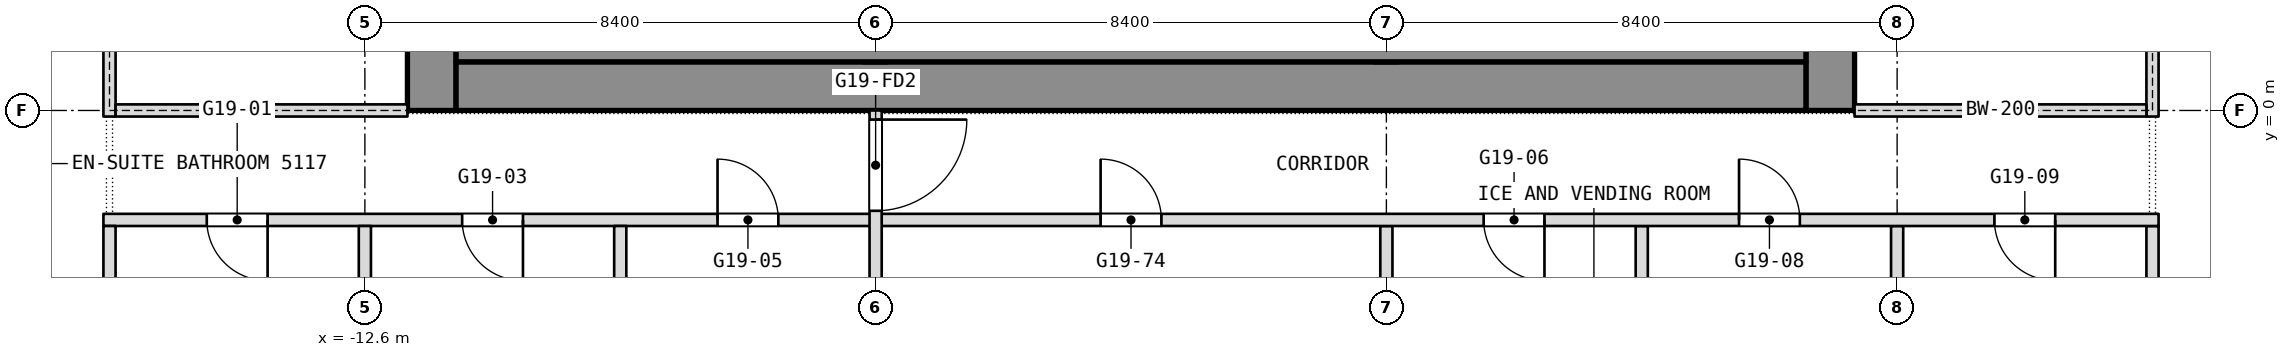
"""IFC4 building model, lengths in metres.
Left out: names, types, materials, properties, quantities, classifications, styles, units other than length and angle.
Written with IfcOpenShell. Run it as: python <this file> out.ifc"""

import sys

from ifc_helpers import new_model, si_unit, direction, frame, frame_2d, origin, place, context, subcontext, project, spatial, rectangle, extrude, element, fill, save


model = new_model("IFC4")
c1 = context("Model", 3, precision=1e-05, world=origin(), true_north=direction((0.0, 1.0)))
c2 = subcontext(c1, "Body", "Model", "MODEL_VIEW")
j1 = project(units=[si_unit("LENGTHUNIT", "METRE"), si_unit("PLANEANGLEUNIT", "RADIAN")], contexts=[c1])
p1 = place(None, origin())
s1 = spatial("IfcSite", under=j1, at=p1, CompositionType="ELEMENT")
p2 = place(p1, origin())
s2 = spatial("IfcBuilding", under=s1, at=p2, CompositionType="ELEMENT")
p3 = place(p2, frame((0.0, 0.0, 220.1)))
s3 = spatial("IfcBuildingStorey", under=s2, at=p3, CompositionType="ELEMENT", Elevation=220.1)
p4 = place(p3, frame((11.5, 0.0, 0.0), z_axis=(0.0, 0.0, 1.0), x_axis=(0.0, 1.0, 0.0)))
e1 = element("IfcWall", 1, at=p4, inside=s3, PredefinedType="SHEAR", context=c2, shape_type="SweptSolid", body=[
    extrude(rectangle(XDim=16.8, YDim=0.8, at=frame_2d((8.4, 0.0))), origin(), (0.0, 0.0, 1.0), 3.6),
])
p5 = place(p4, frame((2.3, 0.0, 0.0)))
e2 = element("IfcOpeningElement", 2, at=p5, cuts=e1, PredefinedType="OPENING", context=c2, shape_type="SweptSolid", body=[
    extrude(rectangle(XDim=1.1, YDim=2.1, at=frame_2d((0.55, 1.05))), frame((0.0, 0.4, 0.0), z_axis=(0.0, -1.0, 0.0), x_axis=(1.0, 0.0, 0.0)), (0.0, 0.0, 1.0), 0.8),
])
p6 = place(p4, frame((4.85, 0.0, 0.0)))
e3 = element("IfcOpeningElement", 3, at=p6, cuts=e1, PredefinedType="OPENING", context=c2, shape_type="SweptSolid", body=[
    extrude(rectangle(XDim=1.1, YDim=2.1, at=frame_2d((0.55, 1.05))), frame((0.0, 0.4, 0.0), z_axis=(0.0, -1.0, 0.0), x_axis=(1.0, 0.0, 0.0)), (0.0, 0.0, 1.0), 0.8),
])
p7 = place(p4, frame((6.825, 0.0, 0.0)))
e4 = element("IfcOpeningElement", 4, at=p7, cuts=e1, PredefinedType="OPENING", context=c2, shape_type="SweptSolid", body=[
    extrude(rectangle(XDim=1.2, YDim=2.1, at=frame_2d((0.6, 1.05))), frame((0.0, 0.4, 0.0), z_axis=(0.0, -1.0, 0.0), x_axis=(1.0, 0.0, 0.0)), (0.0, 0.0, 1.0), 0.8),
])
p8 = place(p4, frame((13.4, 0.0, 0.0)))
e5 = element("IfcOpeningElement", 5, at=p8, cuts=e1, PredefinedType="OPENING", context=c2, shape_type="SweptSolid", body=[
    extrude(rectangle(XDim=1.1, YDim=2.1, at=frame_2d((0.55, 1.05))), frame((0.0, 0.4, 0.0), z_axis=(0.0, -1.0, 0.0), x_axis=(1.0, 0.0, 0.0)), (0.0, 0.0, 1.0), 0.8),
])
p9 = place(p4, frame((10.85, 0.0, 0.0)))
e6 = element("IfcOpeningElement", 6, at=p9, cuts=e1, PredefinedType="OPENING", context=c2, shape_type="SweptSolid", body=[
    extrude(rectangle(XDim=1.1, YDim=2.1, at=frame_2d((0.55, 1.05))), frame((0.0, 0.4, 0.0), z_axis=(0.0, -1.0, 0.0), x_axis=(1.0, 0.0, 0.0)), (0.0, 0.0, 1.0), 0.8),
])
p10 = place(p4, frame((8.775, 0.0, 0.0)))
e7 = element("IfcOpeningElement", 7, at=p10, cuts=e1, PredefinedType="OPENING", context=c2, shape_type="SweptSolid", body=[
    extrude(rectangle(XDim=1.2, YDim=2.1, at=frame_2d((0.6, 1.05))), frame((0.0, 0.4, 0.0), z_axis=(0.0, -1.0, 0.0), x_axis=(1.0, 0.0, 0.0)), (0.0, 0.0, 1.0), 0.8),
])
p11 = place(p3, frame((-11.5, 0.0, 0.0), z_axis=(0.0, 0.0, 1.0), x_axis=(0.0, 1.0, 0.0)))
e8 = element("IfcWall", 8, at=p11, inside=s3, PredefinedType="SHEAR", context=c2, shape_type="SweptSolid", body=[
    extrude(rectangle(XDim=16.8, YDim=0.8, at=frame_2d((8.4, 0.0))), origin(), (0.0, 0.0, 1.0), 3.6),
])
p12 = place(p11, frame((3.6, 0.0, 0.0)))
e9 = element("IfcOpeningElement", 9, at=p12, cuts=e8, PredefinedType="OPENING", context=c2, shape_type="SweptSolid", body=[
    extrude(rectangle(XDim=0.9, YDim=2.1, at=frame_2d((0.45, 1.05))), frame((0.0, 0.4, 0.0), z_axis=(0.0, -1.0, 0.0), x_axis=(1.0, 0.0, 0.0)), (0.0, 0.0, 1.0), 0.8),
])
p13 = place(p11, frame((6.825, 0.0, 0.0)))
e10 = element("IfcOpeningElement", 10, at=p13, cuts=e8, PredefinedType="OPENING", context=c2, shape_type="SweptSolid", body=[
    extrude(rectangle(XDim=1.2, YDim=2.1, at=frame_2d((0.6, 1.05))), frame((0.0, 0.4, 0.0), z_axis=(0.0, -1.0, 0.0), x_axis=(1.0, 0.0, 0.0)), (0.0, 0.0, 1.0), 0.8),
])
p14 = place(p11, frame((12.3, 0.0, 0.0)))
e11 = element("IfcOpeningElement", 11, at=p14, cuts=e8, PredefinedType="OPENING", context=c2, shape_type="SweptSolid", body=[
    extrude(rectangle(XDim=0.9, YDim=2.1, at=frame_2d((0.45, 1.05))), frame((0.0, 0.4, 0.0), z_axis=(0.0, -1.0, 0.0), x_axis=(1.0, 0.0, 0.0)), (0.0, 0.0, 1.0), 0.8),
])
p15 = place(p11, frame((8.775, 0.0, 0.0)))
e12 = element("IfcOpeningElement", 12, at=p15, cuts=e8, PredefinedType="OPENING", context=c2, shape_type="SweptSolid", body=[
    extrude(rectangle(XDim=1.2, YDim=2.1, at=frame_2d((0.6, 1.05))), frame((0.0, 0.4, 0.0), z_axis=(0.0, -1.0, 0.0), x_axis=(1.0, 0.0, 0.0)), (0.0, 0.0, 1.0), 0.8),
])
p16 = place(p3, frame((-11.1, 0.4, 0.0), z_axis=(0.0, 0.0, 1.0), x_axis=(1.0, 0.0, 0.0)))
e13 = element("IfcWall", 13, at=p16, inside=s3, PredefinedType="SHEAR", context=c2, shape_type="SweptSolid", body=[
    extrude(rectangle(XDim=22.2, YDim=0.8, at=frame_2d((11.1, 0.0))), origin(), (0.0, 0.0, 1.0), 3.6),
])
p17 = place(p3, frame((-4.2, 0.8, 0.0), z_axis=(0.0, 0.0, 1.0), x_axis=(0.0, 1.0, 0.0)))
e14 = element("IfcWall", 14, at=p17, inside=s3, PredefinedType="SHEAR", context=c2, shape_type="SweptSolid", body=[
    extrude(rectangle(XDim=15.2, YDim=0.4, at=frame_2d((7.6, 0.0))), origin(), (0.0, 0.0, 1.0), 3.6),
])
p18 = place(p17, frame((8.5, 0.0, 0.0)))
e15 = element("IfcOpeningElement", 15, at=p18, cuts=e14, PredefinedType="OPENING", context=c2, shape_type="SweptSolid", body=[
    extrude(rectangle(XDim=1.2, YDim=2.1, at=frame_2d((0.6, 1.05))), frame((0.0, 0.2, 0.0), z_axis=(0.0, -1.0, 0.0), x_axis=(1.0, 0.0, 0.0)), (0.0, 0.0, 1.0), 0.4),
])
p19 = place(p3, frame((4.2, 0.8, 0.0), z_axis=(0.0, 0.0, 1.0), x_axis=(0.0, 1.0, 0.0)))
e16 = element("IfcWall", 16, at=p19, inside=s3, PredefinedType="SHEAR", context=c2, shape_type="SweptSolid", body=[
    extrude(rectangle(XDim=15.2, YDim=0.4, at=frame_2d((7.6, 0.0))), origin(), (0.0, 0.0, 1.0), 3.6),
])
p20 = place(p19, frame((5.95, 0.0, 0.0)))
e17 = element("IfcOpeningElement", 17, at=p20, cuts=e16, PredefinedType="OPENING", context=c2, shape_type="SweptSolid", body=[
    extrude(rectangle(XDim=1.2, YDim=2.1, at=frame_2d((0.6, 1.05))), frame((0.0, 0.2, 0.0), z_axis=(0.0, -1.0, 0.0), x_axis=(1.0, 0.0, 0.0)), (0.0, 0.0, 1.0), 0.4),
])
for number, where, z_axis, x_axis in (
    (18, (16.8, -7.8, 0.0), (0.0, 0.0, 1.0), (0.0, 1.0, 0.0)),
    (19, (12.6, -7.8, 0.0), (0.0, 0.0, 1.0), (0.0, 1.0, 0.0)),
):
    element("IfcWall", number, at=place(p3, frame(where, z_axis=z_axis, x_axis=x_axis)), inside=s3, PredefinedType="PARTITIONING", context=c2, shape_type="SweptSolid", body=[
        extrude(rectangle(XDim=5.9, YDim=0.2, at=frame_2d((2.95, 0.0))), origin(), (0.0, 0.0, 1.0), 3.34),
    ])
p21 = place(p3, frame((8.4, -8.0, 0.0), z_axis=(0.0, 0.0, 1.0), x_axis=(0.0, 1.0, 0.0)))
e20 = element("IfcWall", 20, at=p21, inside=s3, PredefinedType="PARTITIONING", context=c2, shape_type="SweptSolid", body=[
    extrude(rectangle(XDim=6.1, YDim=0.2, at=frame_2d((3.05, 0.0))), origin(), (0.0, 0.0, 1.0), 3.34),
])
p22 = place(p3, frame((4.2, -11.6, 0.0), z_axis=(0.0, 0.0, 1.0), x_axis=(0.0, 1.0, 0.0)))
e21 = element("IfcWall", 21, at=p22, inside=s3, PredefinedType="PARTITIONING", context=c2, shape_type="SweptSolid", body=[
    extrude(rectangle(XDim=9.7, YDim=0.2, at=frame_2d((4.85, 0.0))), origin(), (0.0, 0.0, 1.0), 3.34),
])
p23 = place(p3, frame((-16.9, -1.8, 0.0), z_axis=(0.0, 0.0, 1.0), x_axis=(1.0, 0.0, 0.0)))
e22 = element("IfcWall", 22, at=p23, inside=s3, PredefinedType="PARTITIONING", context=c2, shape_type="SweptSolid", body=[
    extrude(rectangle(XDim=33.8, YDim=0.2, at=frame_2d((16.9, 0.0))), origin(), (0.0, 0.0, 1.0), 3.34),
])
p24 = place(p23, frame((1.7, 0.0, 0.0)))
e23 = element("IfcOpeningElement", 23, at=p24, cuts=e22, PredefinedType="OPENING", context=c2, shape_type="SweptSolid", body=[
    extrude(rectangle(XDim=1.0, YDim=2.1, at=frame_2d((0.5, 1.05))), frame((0.0, 0.1, 0.0), z_axis=(0.0, -1.0, 0.0), x_axis=(1.0, 0.0, 0.0)), (0.0, 0.0, 1.0), 0.2),
])
p25 = place(p23, frame((5.9, 0.0, 0.0)))
e24 = element("IfcOpeningElement", 24, at=p25, cuts=e22, PredefinedType="OPENING", context=c2, shape_type="SweptSolid", body=[
    extrude(rectangle(XDim=1.0, YDim=2.1, at=frame_2d((0.5, 1.05))), frame((0.0, 0.1, 0.0), z_axis=(0.0, -1.0, 0.0), x_axis=(1.0, 0.0, 0.0)), (0.0, 0.0, 1.0), 0.2),
])
p26 = place(p23, frame((10.1, 0.0, 0.0)))
e25 = element("IfcOpeningElement", 25, at=p26, cuts=e22, PredefinedType="OPENING", context=c2, shape_type="SweptSolid", body=[
    extrude(rectangle(XDim=1.0, YDim=2.1, at=frame_2d((0.5, 1.05))), frame((0.0, 0.1, 0.0), z_axis=(0.0, -1.0, 0.0), x_axis=(1.0, 0.0, 0.0)), (0.0, 0.0, 1.0), 0.2),
])
p27 = place(p23, frame((22.7, 0.0, 0.0)))
e26 = element("IfcOpeningElement", 26, at=p27, cuts=e22, PredefinedType="OPENING", context=c2, shape_type="SweptSolid", body=[
    extrude(rectangle(XDim=1.0, YDim=2.1, at=frame_2d((0.5, 1.05))), frame((0.0, 0.1, 0.0), z_axis=(0.0, -1.0, 0.0), x_axis=(1.0, 0.0, 0.0)), (0.0, 0.0, 1.0), 0.2),
])
p28 = place(p23, frame((26.9, 0.0, 0.0)))
e27 = element("IfcOpeningElement", 27, at=p28, cuts=e22, PredefinedType="OPENING", context=c2, shape_type="SweptSolid", body=[
    extrude(rectangle(XDim=1.0, YDim=2.1, at=frame_2d((0.5, 1.05))), frame((0.0, 0.1, 0.0), z_axis=(0.0, -1.0, 0.0), x_axis=(1.0, 0.0, 0.0)), (0.0, 0.0, 1.0), 0.2),
])
p29 = place(p23, frame((31.1, 0.0, 0.0)))
e28 = element("IfcOpeningElement", 28, at=p29, cuts=e22, PredefinedType="OPENING", context=c2, shape_type="SweptSolid", body=[
    extrude(rectangle(XDim=1.0, YDim=2.1, at=frame_2d((0.5, 1.05))), frame((0.0, 0.1, 0.0), z_axis=(0.0, -1.0, 0.0), x_axis=(1.0, 0.0, 0.0)), (0.0, 0.0, 1.0), 0.2),
])
p30 = place(p23, frame((16.4, 0.0, 0.0)))
e29 = element("IfcOpeningElement", 29, at=p30, cuts=e22, PredefinedType="OPENING", context=c2, shape_type="SweptSolid", body=[
    extrude(rectangle(XDim=1.0, YDim=2.1, at=frame_2d((0.5, 1.05))), frame((0.0, 0.1, 0.0), z_axis=(0.0, -1.0, 0.0), x_axis=(1.0, 0.0, 0.0)), (0.0, 0.0, 1.0), 0.2),
])
p31 = place(p3, frame((-4.2, -13.6, 0.0), z_axis=(0.0, 0.0, 1.0), x_axis=(0.0, 1.0, 0.0)))
e30 = element("IfcWall", 30, at=p31, inside=s3, PredefinedType="PARTITIONING", context=c2, shape_type="SweptSolid", body=[
    extrude(rectangle(XDim=13.6, YDim=0.2, at=frame_2d((6.8, 0.0))), origin(), (0.0, 0.0, 1.0), 3.34),
])
p32 = place(p31, frame((11.95, 0.0, 0.0)))
e31 = element("IfcOpeningElement", 31, at=p32, cuts=e30, PredefinedType="OPENING", context=c2, shape_type="SweptSolid", body=[
    extrude(rectangle(XDim=1.5, YDim=2.1, at=frame_2d((0.75, 1.05))), frame((0.0, 0.1, 0.0), z_axis=(0.0, -1.0, 0.0), x_axis=(1.0, 0.0, 0.0)), (0.0, 0.0, 1.0), 0.2),
])
p33 = place(p31, frame((0.25, 0.0, 0.0)))
e32 = element("IfcOpeningElement", 32, at=p33, cuts=e30, PredefinedType="OPENING", context=c2, shape_type="SweptSolid", body=[
    extrude(rectangle(XDim=1.5, YDim=2.1, at=frame_2d((0.75, 1.05))), frame((0.0, 0.1, 0.0), z_axis=(0.0, -1.0, 0.0), x_axis=(1.0, 0.0, 0.0)), (0.0, 0.0, 1.0), 0.2),
])
p34 = place(p3, frame((-8.4, -8.0, 0.0), z_axis=(0.0, 0.0, 1.0), x_axis=(0.0, 1.0, 0.0)))
e33 = element("IfcWall", 33, at=p34, inside=s3, PredefinedType="PARTITIONING", context=c2, shape_type="SweptSolid", body=[
    extrude(rectangle(XDim=6.1, YDim=0.2, at=frame_2d((3.05, 0.0))), origin(), (0.0, 0.0, 1.0), 3.34),
])
p35 = place(p3, frame((-12.6, -7.8, 0.0), z_axis=(0.0, 0.0, 1.0), x_axis=(0.0, 1.0, 0.0)))
e34 = element("IfcWall", 34, at=p35, inside=s3, PredefinedType="PARTITIONING", context=c2, shape_type="SweptSolid", body=[
    extrude(rectangle(XDim=5.9, YDim=0.2, at=frame_2d((2.95, 0.0))), origin(), (0.0, 0.0, 1.0), 3.34),
])
p36 = place(p3, frame((-16.8, -8.0, 0.0), z_axis=(0.0, 0.0, 1.0), x_axis=(0.0, 1.0, 0.0)))
e35 = element("IfcWall", 35, at=p36, inside=s3, PredefinedType="PARTITIONING", context=c2, shape_type="SweptSolid", body=[
    extrude(rectangle(XDim=6.1, YDim=0.2, at=frame_2d((3.05, 0.0))), origin(), (0.0, 0.0, 1.0), 3.34),
])
p37 = place(p3, frame((-11.1, 1.15, 0.0), z_axis=(0.0, 0.0, 1.0), x_axis=(1.0, 0.0, 0.0)))
e36 = element("IfcWall", 36, at=p37, inside=s3, PredefinedType="PARTITIONING", context=c2, shape_type="SweptSolid", body=[
    extrude(rectangle(XDim=22.2, YDim=0.7, at=frame_2d((11.1, 0.0))), origin(), (0.0, 0.0, 1.0), 3.34),
])
p38 = place(p3, frame((-16.8, -0.1, 0.0), z_axis=(0.0, 0.0, 1.0), x_axis=(0.0, 1.0, 0.0)))
e37 = element("IfcWall", 37, at=p38, inside=s3, PredefinedType="PARTITIONING", context=c2, shape_type="SweptSolid", body=[
    extrude(rectangle(XDim=17.0, YDim=0.2, at=frame_2d((8.5, 0.0))), origin(), (0.0, 0.0, 1.0), 3.34),
])
p39 = place(p38, frame((2.2, 0.0, 0.0)))
e38 = element("IfcOpeningElement", 38, at=p39, cuts=e37, PredefinedType="OPENING", context=c2, shape_type="SweptSolid", body=[
    extrude(rectangle(XDim=1.8, YDim=2.1, at=frame_2d((0.9, 1.05))), frame((0.0, 0.1, 0.0), z_axis=(0.0, -1.0, 0.0), x_axis=(1.0, 0.0, 0.0)), (0.0, 0.0, 1.0), 0.2),
])
p40 = place(p38, frame((13.0, 0.0, 0.0)))
e39 = element("IfcOpeningElement", 39, at=p40, cuts=e37, PredefinedType="OPENING", context=c2, shape_type="SweptSolid", body=[
    extrude(rectangle(XDim=1.8, YDim=2.1, at=frame_2d((0.9, 1.05))), frame((0.0, 0.1, 0.0), z_axis=(0.0, -1.0, 0.0), x_axis=(1.0, 0.0, 0.0)), (0.0, 0.0, 1.0), 0.2),
])
p41 = place(p3, frame((-16.7, 0.0, 0.0), z_axis=(0.0, 0.0, 1.0), x_axis=(1.0, 0.0, 0.0)))
e40 = element("IfcWall", 40, at=p41, inside=s3, PredefinedType="PARTITIONING", context=c2, shape_type="SweptSolid", body=[
    extrude(rectangle(XDim=4.8, YDim=0.2, at=frame_2d((2.4, 0.0))), origin(), (0.0, 0.0, 1.0), 2.94),
])
p42 = place(p3, frame((16.8, -0.1, 0.0), z_axis=(0.0, 0.0, 1.0), x_axis=(0.0, 1.0, 0.0)))
e41 = element("IfcWall", 41, at=p42, inside=s3, PredefinedType="PARTITIONING", context=c2, shape_type="SweptSolid", body=[
    extrude(rectangle(XDim=17.0, YDim=0.2, at=frame_2d((8.5, 0.0))), origin(), (0.0, 0.0, 1.0), 3.34),
])
p43 = place(p42, frame((2.2, 0.0, 0.0)))
e42 = element("IfcOpeningElement", 42, at=p43, cuts=e41, PredefinedType="OPENING", context=c2, shape_type="SweptSolid", body=[
    extrude(rectangle(XDim=1.8, YDim=2.1, at=frame_2d((0.9, 1.05))), frame((0.0, 0.1, 0.0), z_axis=(0.0, -1.0, 0.0), x_axis=(1.0, 0.0, 0.0)), (0.0, 0.0, 1.0), 0.2),
])
p44 = place(p42, frame((13.0, 0.0, 0.0)))
e43 = element("IfcOpeningElement", 43, at=p44, cuts=e41, PredefinedType="OPENING", context=c2, shape_type="SweptSolid", body=[
    extrude(rectangle(XDim=1.8, YDim=2.1, at=frame_2d((0.9, 1.05))), frame((0.0, 0.1, 0.0), z_axis=(0.0, -1.0, 0.0), x_axis=(1.0, 0.0, 0.0)), (0.0, 0.0, 1.0), 0.2),
])
p45 = place(p3, frame((11.9, 0.0, 0.0), z_axis=(0.0, 0.0, 1.0), x_axis=(1.0, 0.0, 0.0)))
e44 = element("IfcWall", 44, at=p45, inside=s3, PredefinedType="PARTITIONING", context=c2, shape_type="SweptSolid", body=[
    extrude(rectangle(XDim=4.8, YDim=0.2, at=frame_2d((2.4, 0.0))), origin(), (0.0, 0.0, 1.0), 2.94),
])
p46 = place(p24, origin())
e45 = element("IfcDoor", 45, at=p46, inside=s3, OperationType="SINGLE_SWING_LEFT", PredefinedType="DOOR", context=c2, shape_type="SweptSolid", body=[
    extrude(rectangle(XDim=1.0, YDim=2.1, at=frame_2d((0.5, 1.05))), frame((0.0, 0.025, 0.0), z_axis=(0.0, -1.0, 0.0), x_axis=(1.0, 0.0, 0.0)), (0.0, 0.0, 1.0), 0.05),
])
fill(e23, e45)
p47 = place(p25, origin())
e46 = element("IfcDoor", 46, at=p47, inside=s3, OperationType="SINGLE_SWING_LEFT", PredefinedType="DOOR", context=c2, shape_type="SweptSolid", body=[
    extrude(rectangle(XDim=1.0, YDim=2.1, at=frame_2d((0.5, 1.05))), frame((0.0, 0.025, 0.0), z_axis=(0.0, -1.0, 0.0), x_axis=(1.0, 0.0, 0.0)), (0.0, 0.0, 1.0), 0.05),
])
fill(e24, e46)
p48 = place(p26, origin())
e47 = element("IfcDoor", 47, at=p48, inside=s3, OperationType="SINGLE_SWING_RIGHT", PredefinedType="DOOR", context=c2, shape_type="SweptSolid", body=[
    extrude(rectangle(XDim=1.0, YDim=2.1, at=frame_2d((0.5, 1.05))), frame((0.0, 0.025, 0.0), z_axis=(0.0, -1.0, 0.0), x_axis=(1.0, 0.0, 0.0)), (0.0, 0.0, 1.0), 0.05),
])
fill(e25, e47)
p49 = place(p27, origin())
e48 = element("IfcDoor", 48, at=p49, inside=s3, OperationType="SINGLE_SWING_RIGHT", PredefinedType="DOOR", context=c2, shape_type="SweptSolid", body=[
    extrude(rectangle(XDim=1.0, YDim=2.1, at=frame_2d((0.5, 1.05))), frame((0.0, 0.025, 0.0), z_axis=(0.0, -1.0, 0.0), x_axis=(1.0, 0.0, 0.0)), (0.0, 0.0, 1.0), 0.05),
])
fill(e26, e48)
p50 = place(p28, origin())
e49 = element("IfcDoor", 49, at=p50, inside=s3, OperationType="SINGLE_SWING_LEFT", PredefinedType="DOOR", context=c2, shape_type="SweptSolid", body=[
    extrude(rectangle(XDim=1.0, YDim=2.1, at=frame_2d((0.5, 1.05))), frame((0.0, 0.025, 0.0), z_axis=(0.0, -1.0, 0.0), x_axis=(1.0, 0.0, 0.0)), (0.0, 0.0, 1.0), 0.05),
])
fill(e27, e49)
p51 = place(p29, origin())
e50 = element("IfcDoor", 50, at=p51, inside=s3, OperationType="SINGLE_SWING_LEFT", PredefinedType="DOOR", context=c2, shape_type="SweptSolid", body=[
    extrude(rectangle(XDim=1.0, YDim=2.1, at=frame_2d((0.5, 1.05))), frame((0.0, 0.025, 0.0), z_axis=(0.0, -1.0, 0.0), x_axis=(1.0, 0.0, 0.0)), (0.0, 0.0, 1.0), 0.05),
])
fill(e28, e50)
p52 = place(p30, origin())
e51 = element("IfcDoor", 51, at=p52, inside=s3, OperationType="SINGLE_SWING_LEFT", PredefinedType="DOOR", context=c2, shape_type="SweptSolid", body=[
    extrude(rectangle(XDim=1.0, YDim=2.1, at=frame_2d((0.5, 1.05))), frame((0.0, 0.025, 0.0), z_axis=(0.0, -1.0, 0.0), x_axis=(1.0, 0.0, 0.0)), (0.0, 0.0, 1.0), 0.05),
])
fill(e29, e51)
p53 = place(p32, origin())
e52 = element("IfcDoor", 52, at=p53, inside=s3, OperationType="DOUBLE_DOOR_DOUBLE_SWING", PredefinedType="DOOR", context=c2, shape_type="SweptSolid", body=[
    extrude(rectangle(XDim=1.5, YDim=2.1, at=frame_2d((0.75, 1.05))), frame((0.0, 0.025, 0.0), z_axis=(0.0, -1.0, 0.0), x_axis=(1.0, 0.0, 0.0)), (0.0, 0.0, 1.0), 0.05),
])
fill(e31, e52)
save(model, sys.argv[1])
